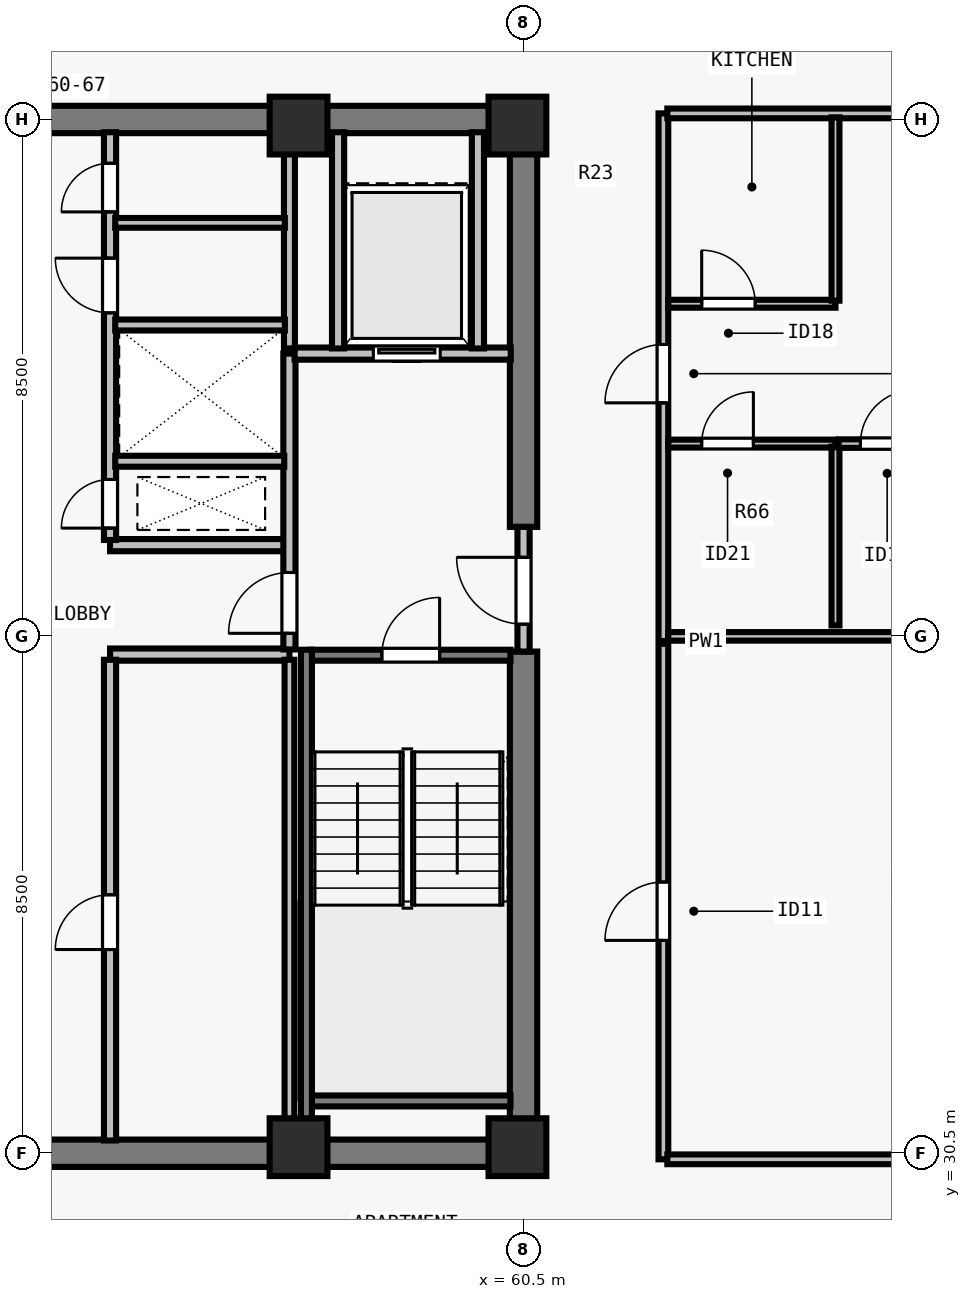
"""IFC4 building model, lengths in metres.
Left out: names, types, materials, properties, quantities, classifications, styles, units other than length and angle.
Written with IfcOpenShell. Run it as: python <this file> out.ifc"""

import sys

from ifc_helpers import new_model, si_unit, direction, frame, frame_2d, origin, origin_2d, place, context, subcontext, project, spatial, rectangle, extrude, element, fill, save


model = new_model("IFC4")
c1 = context("Model", 3, precision=1e-05, world=origin(), true_north=direction((0.0, 1.0)))
c2 = subcontext(c1, "Body", "Model", "MODEL_VIEW")
j1 = project(units=[si_unit("LENGTHUNIT", "METRE"), si_unit("PLANEANGLEUNIT", "RADIAN")], contexts=[c1])
p1 = place(None, origin())
s1 = spatial("IfcSite", under=j1, at=p1, CompositionType="ELEMENT")
p2 = place(p1, origin())
s2 = spatial("IfcBuilding", under=s1, at=p2, CompositionType="ELEMENT")
p3 = place(p2, frame((0.0, 0.0, 234.0)))
s3 = spatial("IfcBuildingStorey", under=s2, at=p3, CompositionType="ELEMENT", Elevation=234.0)
for number, where, z_axis, x_axis in (
    (1, (56.8, 30.6, 0.0), (0.0, 0.0, 1.0), (1.0, 0.0, 0.0)),
    (2, (60.4, 30.6, 0.0), (0.0, 0.0, 1.0), (1.0, 0.0, 0.0)),
    (3, (56.8, 47.4, 0.0), (0.0, 0.0, 1.0), (1.0, 0.0, 0.0)),
    (4, (60.4, 47.4, 0.0), (0.0, 0.0, 1.0), (1.0, 0.0, 0.0)),
):
    element("IfcColumn", number, at=place(p3, frame(where, z_axis=z_axis, x_axis=x_axis)), inside=s3, PredefinedType="COLUMN", context=c2, shape_type="SweptSolid", body=[
        extrude(rectangle(XDim=0.95, YDim=0.95, at=origin_2d()), origin(), (0.0, 0.0, 1.0), 3.5),
    ])
for number, where, z_axis, x_axis in (
    (5, (43.275, 30.5, 0.0), (0.0, 0.0, 1.0), (1.0, 0.0, 0.0)),
    (6, (43.275, 47.5, 0.0), (0.0, 0.0, 1.0), (1.0, 0.0, 0.0)),
):
    element("IfcWall", number, at=place(p3, frame(where, z_axis=z_axis, x_axis=x_axis)), inside=s3, PredefinedType="SHEAR", context=c2, shape_type="SweptSolid", body=[
        extrude(rectangle(XDim=17.45, YDim=0.45, at=frame_2d((8.725, 0.0))), origin(), (0.0, 0.0, 1.0), 3.29),
    ])
p4 = place(p3, frame((60.5, 30.715, 0.0), z_axis=(0.0, 0.0, 1.0), x_axis=(0.0, 1.0, 0.0)))
e7 = element("IfcWall", 7, at=p4, inside=s3, PredefinedType="SHEAR", context=c2, shape_type="SweptSolid", body=[
    extrude(rectangle(XDim=8.035, YDim=0.45, at=frame_2d((4.018, 0.0))), origin(), (0.0, 0.0, 1.0), 3.29),
])
p5 = place(p3, frame((60.5, 40.8, 0.0), z_axis=(0.0, 0.0, 1.0), x_axis=(0.0, 1.0, 0.0)))
e8 = element("IfcWall", 8, at=p5, inside=s3, PredefinedType="SHEAR", context=c2, shape_type="SweptSolid", body=[
    extrude(rectangle(XDim=6.485, YDim=0.45, at=frame_2d((3.242, 0.0))), origin(), (0.0, 0.0, 1.0), 3.29),
])
for number, where, z_axis, x_axis in (
    (9, (53.7, 38.7, 0.0), (0.0, 0.0, 1.0), (1.0, 0.0, 0.0)),
    (10, (53.7, 40.5, 0.0), (0.0, 0.0, 1.0), (1.0, 0.0, 0.0)),
):
    element("IfcWall", number, at=place(p3, frame(where, z_axis=z_axis, x_axis=x_axis)), inside=s3, PredefinedType="SOLIDWALL", context=c2, shape_type="SweptSolid", body=[
        extrude(rectangle(XDim=2.95, YDim=0.2, at=frame_2d((1.475, 0.0))), origin(), (0.0, 0.0, 1.0), 3.29),
    ])
p6 = place(p3, frame((53.7, 30.71, 0.0), z_axis=(0.0, 0.0, 1.0), x_axis=(0.0, 1.0, 0.0)))
e11 = element("IfcWall", 11, at=p6, inside=s3, PredefinedType="SOLIDWALL", context=c2, shape_type="SweptSolid", body=[
    extrude(rectangle(XDim=7.905, YDim=0.2, at=frame_2d((3.953, 0.0))), origin(), (0.0, 0.0, 1.0), 3.29),
])
p7 = place(p6, frame((3.14, 0.0, 0.0)))
e12 = element("IfcOpeningElement", 12, at=p7, cuts=e11, PredefinedType="OPENING", context=c2, shape_type="SweptSolid", body=[
    extrude(rectangle(XDim=0.9, YDim=2.12, at=frame_2d((0.45, 1.06))), frame((0.0, 0.11, 0.0), z_axis=(0.0, -1.0, 0.0), x_axis=(1.0, 0.0, 0.0)), (0.0, 0.0, 1.0), 0.22),
])
p8 = place(p3, frame((53.7, 40.585, 0.0), z_axis=(0.0, 0.0, 1.0), x_axis=(0.0, 1.0, 0.0)))
e13 = element("IfcWall", 13, at=p8, inside=s3, PredefinedType="SOLIDWALL", context=c2, shape_type="SweptSolid", body=[
    extrude(rectangle(XDim=6.705, YDim=0.2, at=frame_2d((3.353, 0.0))), origin(), (0.0, 0.0, 1.0), 3.29),
])
p9 = place(p8, frame((0.195, 0.0, 0.0)))
e14 = element("IfcOpeningElement", 14, at=p9, cuts=e13, PredefinedType="OPENING", context=c2, shape_type="SweptSolid", body=[
    extrude(rectangle(XDim=0.8, YDim=2.08, at=frame_2d((0.4, 1.04))), frame((0.0, 0.11, 0.0), z_axis=(0.0, -1.0, 0.0), x_axis=(1.0, 0.0, 0.0)), (0.0, 0.0, 1.0), 0.22),
])
p10 = place(p8, frame((3.735, 0.0, 0.0)))
e15 = element("IfcOpeningElement", 15, at=p10, cuts=e13, PredefinedType="OPENING", context=c2, shape_type="SweptSolid", body=[
    extrude(rectangle(XDim=0.9, YDim=2.12, at=frame_2d((0.45, 1.06))), frame((0.0, 0.11, 0.0), z_axis=(0.0, -1.0, 0.0), x_axis=(1.0, 0.0, 0.0)), (0.0, 0.0, 1.0), 0.22),
])
p11 = place(p8, frame((5.395, 0.0, 0.0)))
e16 = element("IfcOpeningElement", 16, at=p11, cuts=e13, PredefinedType="OPENING", context=c2, shape_type="SweptSolid", body=[
    extrude(rectangle(XDim=0.8, YDim=2.1, at=frame_2d((0.4, 1.05))), frame((0.0, 0.11, 0.0), z_axis=(0.0, -1.0, 0.0), x_axis=(1.0, 0.0, 0.0)), (0.0, 0.0, 1.0), 0.22),
])
p12 = place(p3, frame((60.5, 38.75, 0.0), z_axis=(0.0, 0.0, 1.0), x_axis=(0.0, 1.0, 0.0)))
e17 = element("IfcWall", 17, at=p12, inside=s3, PredefinedType="SOLIDWALL", context=c2, shape_type="SweptSolid", body=[
    extrude(rectangle(XDim=2.05, YDim=0.2, at=frame_2d((1.025, 0.0))), origin(), (0.0, 0.0, 1.0), 3.29),
])
p13 = place(p12, frame((0.45, 0.0, 0.0)))
e18 = element("IfcOpeningElement", 18, at=p13, cuts=e17, PredefinedType="OPENING", context=c2, shape_type="SweptSolid", body=[
    extrude(rectangle(XDim=1.1, YDim=2.15, at=frame_2d((0.55, 1.075))), frame((0.0, 0.11, 0.0), z_axis=(0.0, -1.0, 0.0), x_axis=(1.0, 0.0, 0.0)), (0.0, 0.0, 1.0), 0.22),
])
p14 = place(p3, frame((56.65, 38.785, 0.0), z_axis=(0.0, 0.0, 1.0), x_axis=(0.0, 1.0, 0.0)))
e19 = element("IfcWall", 19, at=p14, inside=s3, PredefinedType="SOLIDWALL", context=c2, shape_type="SweptSolid", body=[
    extrude(rectangle(XDim=4.865, YDim=0.2, at=frame_2d((2.433, 0.0))), origin(), (0.0, 0.0, 1.0), 3.29),
])
p15 = place(p14, frame((0.265, 0.0, 0.0)))
e20 = element("IfcOpeningElement", 20, at=p15, cuts=e19, PredefinedType="OPENING", context=c2, shape_type="SweptSolid", body=[
    extrude(rectangle(XDim=1.0, YDim=2.15, at=frame_2d((0.5, 1.075))), frame((0.0, 0.11, 0.0), z_axis=(0.0, -1.0, 0.0), x_axis=(1.0, 0.0, 0.0)), (0.0, 0.0, 1.0), 0.22),
])
p16 = place(p3, frame((56.735, 43.65, 0.0), z_axis=(0.0, 0.0, 1.0), x_axis=(1.0, 0.0, 0.0)))
e21 = element("IfcWall", 21, at=p16, inside=s3, PredefinedType="SOLIDWALL", context=c2, shape_type="SweptSolid", body=[
    extrude(rectangle(XDim=3.555, YDim=0.2, at=frame_2d((1.777, 0.0))), origin(), (0.0, 0.0, 1.0), 3.29),
])
p17 = place(p16, frame((1.295, 0.0, 0.0)))
e22 = element("IfcOpeningElement", 22, at=p17, cuts=e21, PredefinedType="OPENING", context=c2, shape_type="SweptSolid", body=[
    extrude(rectangle(XDim=1.1, YDim=2.2, at=frame_2d((0.55, 1.1))), frame((0.0, 0.11, 0.0), z_axis=(0.0, -1.0, 0.0), x_axis=(1.0, 0.0, 0.0)), (0.0, 0.0, 1.0), 0.22),
])
for number, where, z_axis, x_axis in (
    (23, (57.45, 43.735, 0.0), (0.0, 0.0, 1.0), (0.0, 1.0, 0.0)),
    (24, (59.75, 43.735, 0.0), (0.0, 0.0, 1.0), (0.0, 1.0, 0.0)),
):
    element("IfcWall", number, at=place(p3, frame(where, z_axis=z_axis, x_axis=x_axis)), inside=s3, PredefinedType="SOLIDWALL", context=c2, shape_type="SweptSolid", body=[
        extrude(rectangle(XDim=3.555, YDim=0.2, at=frame_2d((1.777, 0.0))), origin(), (0.0, 0.0, 1.0), 3.29),
    ])
p18 = place(p3, frame((56.65, 30.71, 0.0), z_axis=(0.0, 0.0, 1.0), x_axis=(0.0, 1.0, 0.0)))
e25 = element("IfcWall", 25, at=p18, inside=s3, PredefinedType="PARTITIONING", context=c2, shape_type="SweptSolid", body=[
    extrude(rectangle(XDim=7.905, YDim=0.16, at=frame_2d((3.953, 0.0))), origin(), (0.0, 0.0, 1.0), 3.29),
])
p19 = place(p3, frame((56.65, 43.735, 0.0), z_axis=(0.0, 0.0, 1.0), x_axis=(0.0, 1.0, 0.0)))
e26 = element("IfcWall", 26, at=p19, inside=s3, PredefinedType="SOLIDWALL", context=c2, shape_type="SweptSolid", body=[
    extrude(rectangle(XDim=3.555, YDim=0.18, at=frame_2d((1.777, 0.0))), origin(), (0.0, 0.0, 1.0), 3.29),
])
p20 = place(p3, frame((53.785, 41.88, 0.0), z_axis=(0.0, 0.0, 1.0), x_axis=(1.0, 0.0, 0.0)))
e27 = element("IfcWall", 27, at=p20, inside=s3, PredefinedType="SOLIDWALL", context=c2, shape_type="SweptSolid", body=[
    extrude(rectangle(XDim=2.78, YDim=0.18, at=frame_2d((1.39, 0.0))), origin(), (0.0, 0.0, 1.0), 3.29),
])
p21 = place(p3, frame((53.785, 44.12, 0.0), z_axis=(0.0, 0.0, 1.0), x_axis=(1.0, 0.0, 0.0)))
e28 = element("IfcWall", 28, at=p21, inside=s3, PredefinedType="SOLIDWALL", context=c2, shape_type="SweptSolid", body=[
    extrude(rectangle(XDim=2.79, YDim=0.18, at=frame_2d((1.395, 0.0))), origin(), (0.0, 0.0, 1.0), 3.29),
])
p22 = place(p3, frame((53.785, 45.8, 0.0), z_axis=(0.0, 0.0, 1.0), x_axis=(1.0, 0.0, 0.0)))
e29 = element("IfcWall", 29, at=p22, inside=s3, PredefinedType="PARTITIONING", context=c2, shape_type="SweptSolid", body=[
    extrude(rectangle(XDim=2.79, YDim=0.16, at=frame_2d((1.395, 0.0))), origin(), (0.0, 0.0, 1.0), 3.29),
])
p23 = place(p3, frame((62.8, 30.4, 0.0), z_axis=(0.0, 0.0, 1.0), x_axis=(0.0, 1.0, 0.0)))
e30 = element("IfcWall", 30, at=p23, inside=s3, PredefinedType="PARTITIONING", context=c2, shape_type="SweptSolid", body=[
    extrude(rectangle(XDim=17.2, YDim=0.16, at=frame_2d((8.6, 0.0))), origin(), (0.0, 0.0, 1.0), 3.29),
])
p24 = place(p23, frame((3.6, 0.0, 0.0)))
e31 = element("IfcOpeningElement", 31, at=p24, cuts=e30, PredefinedType="OPENING", context=c2, shape_type="SweptSolid", body=[
    extrude(rectangle(XDim=0.96, YDim=2.12, at=frame_2d((0.48, 1.06))), frame((0.0, 0.09, 0.0), z_axis=(0.0, -1.0, 0.0), x_axis=(1.0, 0.0, 0.0)), (0.0, 0.0, 1.0), 0.18),
])
p25 = place(p23, frame((12.44, 0.0, 0.0)))
e32 = element("IfcOpeningElement", 32, at=p25, cuts=e30, PredefinedType="OPENING", context=c2, shape_type="SweptSolid", body=[
    extrude(rectangle(XDim=0.96, YDim=2.18, at=frame_2d((0.48, 1.09))), frame((0.0, 0.09, 0.0), z_axis=(0.0, -1.0, 0.0), x_axis=(1.0, 0.0, 0.0)), (0.0, 0.0, 1.0), 0.18),
])
for number, where, z_axis, x_axis in (
    (33, (62.865, 30.4, 0.0), (0.0, 0.0, 1.0), (1.0, 0.0, 0.0)),
    (34, (62.865, 47.6, 0.0), (0.0, 0.0, 1.0), (1.0, 0.0, 0.0)),
):
    element("IfcWall", number, at=place(p3, frame(where, z_axis=z_axis, x_axis=x_axis)), inside=s3, PredefinedType="PARTITIONING", context=c2, shape_type="SweptSolid", body=[
        extrude(rectangle(XDim=11.33, YDim=0.16, at=frame_2d((5.665, 0.0))), origin(), (0.0, 0.0, 1.0), 3.29),
    ])
p26 = place(p3, frame((62.88, 39.0, 0.0), z_axis=(0.0, 0.0, 1.0), x_axis=(1.0, 0.0, 0.0)))
e35 = element("IfcWall", 35, at=p26, inside=s3, PredefinedType="PARTITIONING", context=c2, shape_type="SweptSolid", body=[
    extrude(rectangle(XDim=11.315, YDim=0.14, at=frame_2d((5.658, 0.0))), origin(), (0.0, 0.0, 1.0), 3.29),
])
p27 = place(p3, frame((62.88, 42.17, 0.0), z_axis=(0.0, 0.0, 1.0), x_axis=(1.0, 0.0, 0.0)))
e36 = element("IfcWall", 36, at=p27, inside=s3, PredefinedType="PLUMBINGWALL", context=c2, shape_type="SweptSolid", body=[
    extrude(rectangle(XDim=2.75, YDim=0.13, at=frame_2d((1.375, 0.0))), origin(), (0.0, 0.0, 1.0), 3.29),
])
p28 = place(p27, frame((0.55, 0.0, 0.0)))
e37 = element("IfcOpeningElement", 37, at=p28, cuts=e36, PredefinedType="OPENING", context=c2, shape_type="SweptSolid", body=[
    extrude(rectangle(XDim=0.85, YDim=2.08, at=frame_2d((0.425, 1.04))), frame((0.0, 0.075, 0.0), z_axis=(0.0, -1.0, 0.0), x_axis=(1.0, 0.0, 0.0)), (0.0, 0.0, 1.0), 0.15),
])
p29 = place(p3, frame((65.63, 39.18, 0.0), z_axis=(0.0, 0.0, 1.0), x_axis=(0.0, 1.0, 0.0)))
e38 = element("IfcWall", 38, at=p29, inside=s3, PredefinedType="PLUMBINGWALL", context=c2, shape_type="SweptSolid", body=[
    extrude(rectangle(XDim=2.94, YDim=0.13, at=frame_2d((1.47, 0.0))), origin(), (0.0, 0.0, 1.0), 3.29),
])
p30 = place(p3, frame((62.88, 44.47, 0.0), z_axis=(0.0, 0.0, 1.0), x_axis=(1.0, 0.0, 0.0)))
e39 = element("IfcWall", 39, at=p30, inside=s3, PredefinedType="PLUMBINGWALL", context=c2, shape_type="SweptSolid", body=[
    extrude(rectangle(XDim=2.75, YDim=0.13, at=frame_2d((1.375, 0.0))), origin(), (0.0, 0.0, 1.0), 3.29),
])
p31 = place(p30, frame((0.55, 0.0, 0.0)))
e40 = element("IfcOpeningElement", 40, at=p31, cuts=e39, PredefinedType="OPENING", context=c2, shape_type="SweptSolid", body=[
    extrude(rectangle(XDim=0.88, YDim=2.1, at=frame_2d((0.44, 1.05))), frame((0.0, 0.075, 0.0), z_axis=(0.0, -1.0, 0.0), x_axis=(1.0, 0.0, 0.0)), (0.0, 0.0, 1.0), 0.15),
])
p32 = place(p3, frame((65.63, 44.52, 0.0), z_axis=(0.0, 0.0, 1.0), x_axis=(0.0, 1.0, 0.0)))
e41 = element("IfcWall", 41, at=p32, inside=s3, PredefinedType="PLUMBINGWALL", context=c2, shape_type="SweptSolid", body=[
    extrude(rectangle(XDim=3.015, YDim=0.13, at=frame_2d((1.507, 0.0))), origin(), (0.0, 0.0, 1.0), 3.29),
])
p33 = place(p3, frame((65.68, 42.17, 0.0), z_axis=(0.0, 0.0, 1.0), x_axis=(1.0, 0.0, 0.0)))
e42 = element("IfcWall", 42, at=p33, inside=s3, PredefinedType="PARTITIONING", context=c2, shape_type="SweptSolid", body=[
    extrude(rectangle(XDim=8.44, YDim=0.14, at=frame_2d((4.22, 0.0))), origin(), (0.0, 0.0, 1.0), 3.29),
])
p34 = place(p33, frame((0.36, 0.0, 0.0)))
e43 = element("IfcOpeningElement", 43, at=p34, cuts=e42, PredefinedType="OPENING", context=c2, shape_type="SweptSolid", body=[
    extrude(rectangle(XDim=0.88, YDim=2.1, at=frame_2d((0.44, 1.05))), frame((0.0, 0.08, 0.0), z_axis=(0.0, -1.0, 0.0), x_axis=(1.0, 0.0, 0.0)), (0.0, 0.0, 1.0), 0.16),
])
p35 = place(p3, frame((57.005, 38.69, 0.0), z_axis=(0.0, 0.0, 1.0), x_axis=(1.0, 0.0, 0.0)))
e44 = element("IfcWall", 44, at=p35, inside=s3, PredefinedType="SOLIDWALL", context=c2, shape_type="SweptSolid", body=[
    extrude(rectangle(XDim=3.28, YDim=0.18, at=frame_2d((1.64, 0.0))), origin(), (0.0, 0.0, 1.0), 3.29),
])
p36 = place(p35, frame((1.165, 0.0, 0.0)))
e45 = element("IfcOpeningElement", 45, at=p36, cuts=e44, PredefinedType="OPENING", context=c2, shape_type="SweptSolid", body=[
    extrude(rectangle(XDim=0.95, YDim=2.15, at=frame_2d((0.475, 1.075))), frame((0.0, 0.1, 0.0), z_axis=(0.0, -1.0, 0.0), x_axis=(1.0, 0.0, 0.0)), (0.0, 0.0, 1.0), 0.2),
])
p37 = place(p3, frame((57.005, 31.36, 0.0), z_axis=(0.0, 0.0, 1.0), x_axis=(1.0, 0.0, 0.0)))
e46 = element("IfcWall", 46, at=p37, inside=s3, PredefinedType="SOLIDWALL", context=c2, shape_type="SweptSolid", body=[
    extrude(rectangle(XDim=3.28, YDim=0.18, at=frame_2d((1.64, 0.0))), origin(), (0.0, 0.0, 1.0), 3.29),
])
p38 = place(p3, frame((56.93, 38.78, 0.0), z_axis=(0.0, 0.0, 1.0), x_axis=(0.0, -1.0, 0.0)))
e47 = element("IfcWall", 47, at=p38, inside=s3, PredefinedType="SOLIDWALL", context=c2, shape_type="SweptSolid", body=[
    extrude(rectangle(XDim=8.067, YDim=0.18, at=frame_2d((4.034, 0.0))), origin(), (0.0, 0.0, 1.0), 3.29),
])
p39 = place(p13, origin())
e48 = element("IfcDoor", 48, at=p39, inside=s3, OperationType="SINGLE_SWING_RIGHT", PredefinedType="DOOR", context=c2, shape_type="SweptSolid", body=[
    extrude(rectangle(XDim=1.1, YDim=2.15, at=frame_2d((0.55, 1.075))), frame((0.0, 0.025, 0.0), z_axis=(0.0, -1.0, 0.0), x_axis=(1.0, 0.0, 0.0)), (0.0, 0.0, 1.0), 0.05),
])
fill(e18, e48)
p40 = place(p15, origin())
e49 = element("IfcDoor", 49, at=p40, inside=s3, OperationType="SINGLE_SWING_LEFT", PredefinedType="DOOR", context=c2, shape_type="SweptSolid", body=[
    extrude(rectangle(XDim=1.0, YDim=2.15, at=frame_2d((0.5, 1.075))), frame((0.0, 0.025, 0.0), z_axis=(0.0, -1.0, 0.0), x_axis=(1.0, 0.0, 0.0)), (0.0, 0.0, 1.0), 0.05),
])
fill(e20, e49)
p41 = place(p17, origin())
e50 = element("IfcDoor", 50, at=p41, inside=s3, OperationType="SLIDING_TO_LEFT", PredefinedType="DOOR", context=c2, shape_type="SweptSolid", body=[
    extrude(rectangle(XDim=1.1, YDim=2.2, at=frame_2d((0.55, 1.1))), frame((0.0, 0.025, 0.0), z_axis=(0.0, -1.0, 0.0), x_axis=(1.0, 0.0, 0.0)), (0.0, 0.0, 1.0), 0.05),
])
fill(e22, e50)
p42 = place(p7, origin())
e51 = element("IfcDoor", 51, at=p42, inside=s3, OperationType="SINGLE_SWING_LEFT", PredefinedType="DOOR", context=c2, shape_type="SweptSolid", body=[
    extrude(rectangle(XDim=0.9, YDim=2.12, at=frame_2d((0.45, 1.06))), frame((0.0, 0.025, 0.0), z_axis=(0.0, -1.0, 0.0), x_axis=(1.0, 0.0, 0.0)), (0.0, 0.0, 1.0), 0.05),
])
fill(e12, e51)
p43 = place(p9, origin())
e52 = element("IfcDoor", 52, at=p43, inside=s3, OperationType="SINGLE_SWING_LEFT", PredefinedType="DOOR", context=c2, shape_type="SweptSolid", body=[
    extrude(rectangle(XDim=0.8, YDim=2.08, at=frame_2d((0.4, 1.04))), frame((0.0, 0.025, 0.0), z_axis=(0.0, -1.0, 0.0), x_axis=(1.0, 0.0, 0.0)), (0.0, 0.0, 1.0), 0.05),
])
fill(e14, e52)
p44 = place(p10, origin())
e53 = element("IfcDoor", 53, at=p44, inside=s3, OperationType="SINGLE_SWING_RIGHT", PredefinedType="DOOR", context=c2, shape_type="SweptSolid", body=[
    extrude(rectangle(XDim=0.9, YDim=2.12, at=frame_2d((0.45, 1.06))), frame((0.0, 0.025, 0.0), z_axis=(0.0, -1.0, 0.0), x_axis=(1.0, 0.0, 0.0)), (0.0, 0.0, 1.0), 0.05),
])
fill(e15, e53)
p45 = place(p11, origin())
e54 = element("IfcDoor", 54, at=p45, inside=s3, OperationType="SINGLE_SWING_LEFT", PredefinedType="DOOR", context=c2, shape_type="SweptSolid", body=[
    extrude(rectangle(XDim=0.8, YDim=2.1, at=frame_2d((0.4, 1.05))), frame((0.0, 0.025, 0.0), z_axis=(0.0, -1.0, 0.0), x_axis=(1.0, 0.0, 0.0)), (0.0, 0.0, 1.0), 0.05),
])
fill(e16, e54)
p46 = place(p24, origin())
e55 = element("IfcDoor", 55, at=p46, inside=s3, OperationType="SINGLE_SWING_LEFT", PredefinedType="DOOR", context=c2, shape_type="SweptSolid", body=[
    extrude(rectangle(XDim=0.96, YDim=2.12, at=frame_2d((0.48, 1.06))), frame((0.0, 0.025, 0.0), z_axis=(0.0, -1.0, 0.0), x_axis=(1.0, 0.0, 0.0)), (0.0, 0.0, 1.0), 0.05),
])
fill(e31, e55)
p47 = place(p28, origin())
e56 = element("IfcDoor", 56, at=p47, inside=s3, OperationType="SINGLE_SWING_RIGHT", PredefinedType="DOOR", context=c2, shape_type="SweptSolid", body=[
    extrude(rectangle(XDim=0.85, YDim=2.08, at=frame_2d((0.425, 1.04))), frame((0.0, 0.025, 0.0), z_axis=(0.0, -1.0, 0.0), x_axis=(1.0, 0.0, 0.0)), (0.0, 0.0, 1.0), 0.05),
])
fill(e37, e56)
p48 = place(p31, origin())
e57 = element("IfcDoor", 57, at=p48, inside=s3, OperationType="SINGLE_SWING_LEFT", PredefinedType="DOOR", context=c2, shape_type="SweptSolid", body=[
    extrude(rectangle(XDim=0.88, YDim=2.1, at=frame_2d((0.44, 1.05))), frame((0.0, 0.025, 0.0), z_axis=(0.0, -1.0, 0.0), x_axis=(1.0, 0.0, 0.0)), (0.0, 0.0, 1.0), 0.05),
])
fill(e40, e57)
p49 = place(p34, origin())
e58 = element("IfcDoor", 58, at=p49, inside=s3, OperationType="SINGLE_SWING_RIGHT", PredefinedType="DOOR", context=c2, shape_type="SweptSolid", body=[
    extrude(rectangle(XDim=0.88, YDim=2.1, at=frame_2d((0.44, 1.05))), frame((0.0, 0.025, 0.0), z_axis=(0.0, -1.0, 0.0), x_axis=(1.0, 0.0, 0.0)), (0.0, 0.0, 1.0), 0.05),
])
fill(e43, e58)
p50 = place(p25, origin())
e59 = element("IfcDoor", 59, at=p50, inside=s3, OperationType="SINGLE_SWING_LEFT", PredefinedType="DOOR", context=c2, shape_type="SweptSolid", body=[
    extrude(rectangle(XDim=0.96, YDim=2.18, at=frame_2d((0.48, 1.09))), frame((0.0, 0.025, 0.0), z_axis=(0.0, -1.0, 0.0), x_axis=(1.0, 0.0, 0.0)), (0.0, 0.0, 1.0), 0.05),
])
fill(e32, e59)
p51 = place(p36, origin())
e60 = element("IfcDoor", 60, at=p51, inside=s3, OperationType="SINGLE_SWING_RIGHT", PredefinedType="DOOR", context=c2, shape_type="SweptSolid", body=[
    extrude(rectangle(XDim=0.95, YDim=2.15, at=frame_2d((0.475, 1.075))), frame((0.0, 0.025, 0.0), z_axis=(0.0, -1.0, 0.0), x_axis=(1.0, 0.0, 0.0)), (0.0, 0.0, 1.0), 0.05),
])
fill(e45, e60)
save(model, sys.argv[1])
